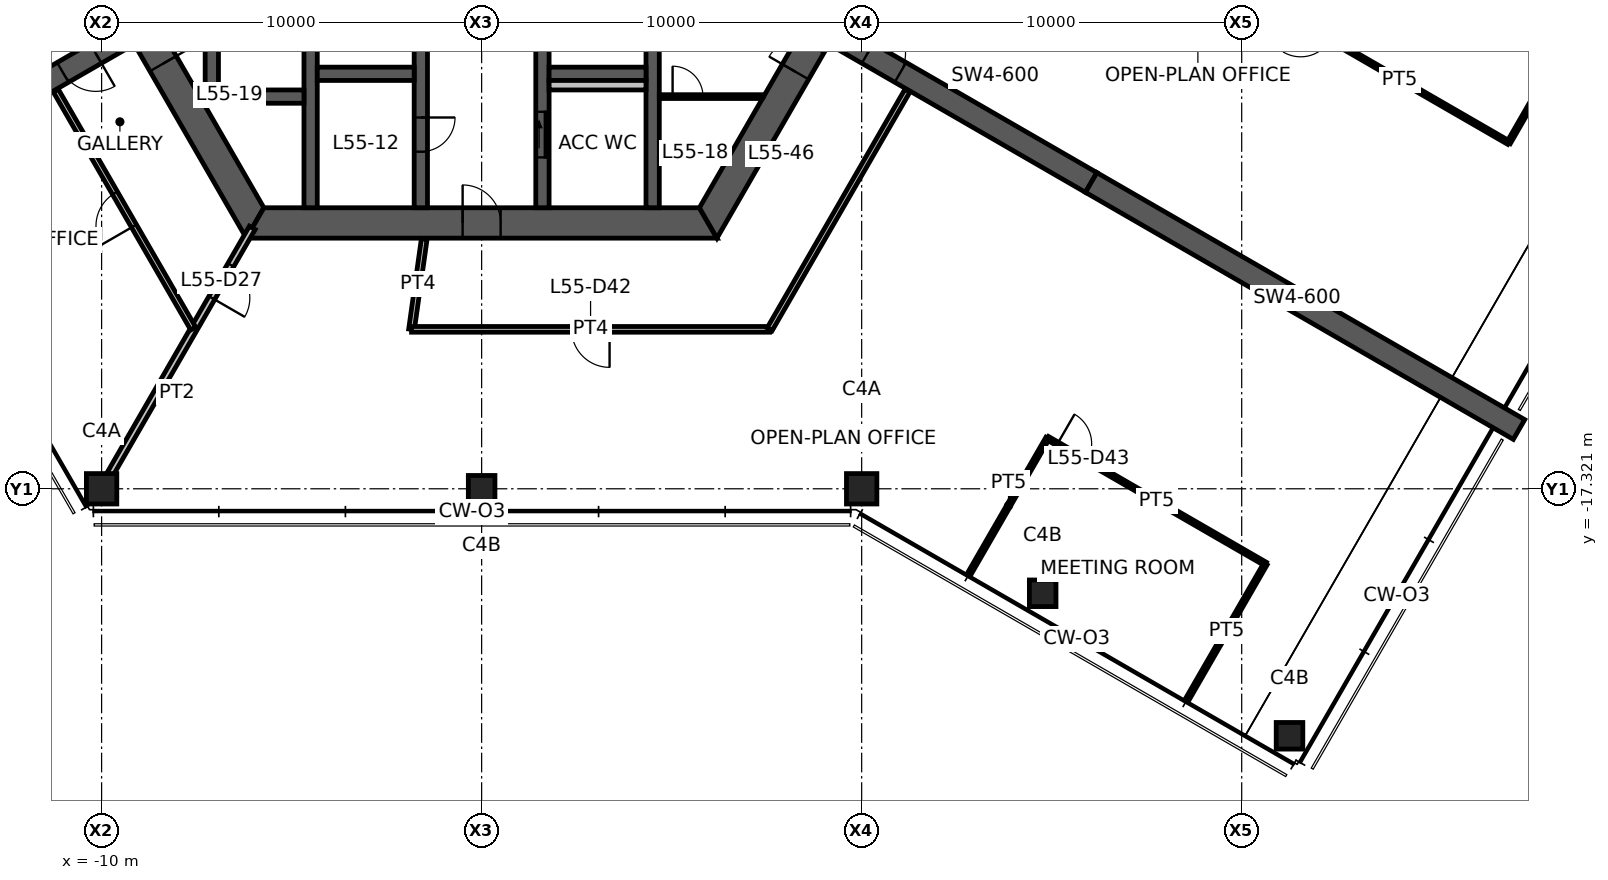
"""IFC4 building model, lengths in metres.
Left out: names, types, materials, properties, quantities, classifications, styles, units other than length and angle.
Written with IfcOpenShell. Run it as: python <this file> out.ifc"""

import sys

from ifc_helpers import new_model, si_unit, direction, frame, frame_2d, origin, origin_2d, place, context, subcontext, project, spatial, polyline, rectangle, hollow_rectangle, outline, extrude, element, fill, save


model = new_model("IFC4")
c1 = context("Model", 3, precision=1e-05, world=origin(), true_north=direction((0.0, 1.0)))
c2 = subcontext(c1, "Body", "Model", "MODEL_VIEW")
j1 = project(units=[si_unit("LENGTHUNIT", "METRE"), si_unit("PLANEANGLEUNIT", "RADIAN")], contexts=[c1])
p1 = place(None, origin())
s1 = spatial("IfcSite", under=j1, at=p1, CompositionType="ELEMENT")
p2 = place(p1, origin())
s2 = spatial("IfcBuilding", under=s1, at=p2, CompositionType="ELEMENT")
p3 = place(p2, frame((0.0, 0.0, 220.6)))
s3 = spatial("IfcBuildingStorey", under=s2, at=p3, CompositionType="ELEMENT", Elevation=220.6)
for number, where, z_axis, x_axis in (
    (1, (-10.0, -17.321, 0.0), (0.0, 0.0, 1.0), (1.0, 0.0, 0.0)),
    (2, (10.0, -17.321, 0.0), (0.0, 0.0, 1.0), (1.0, 0.0, 0.0)),
):
    element("IfcColumn", number, at=place(p3, frame(where, z_axis=z_axis, x_axis=x_axis)), inside=s3, PredefinedType="COLUMN", context=c2, shape_type="SweptSolid", body=[
        extrude(hollow_rectangle(XDim=0.8, YDim=0.8, WallThickness=0.04, at=origin_2d()), origin(), (0.0, 0.0, 1.0), 3.9),
    ])
for number, where, z_axis, x_axis in (
    (3, (0.0, -17.321, 0.0), (0.0, 0.0, 1.0), (1.0, 0.0, 0.0)),
    (4, (14.763, -20.071, 0.0), (0.0, 0.0, 1.0), (1.0, 0.0, 0.0)),
    (5, (21.258, -23.821, 0.0), (0.0, 0.0, 1.0), (1.0, 0.0, 0.0)),
):
    element("IfcColumn", number, at=place(p3, frame(where, z_axis=z_axis, x_axis=x_axis)), inside=s3, PredefinedType="COLUMN", context=c2, shape_type="SweptSolid", body=[
        extrude(hollow_rectangle(XDim=0.7, YDim=0.7, WallThickness=0.032, at=origin_2d()), origin(), (0.0, 0.0, 1.0), 3.9),
    ])
p4 = place(p3, frame((-11.922, 0.0, 0.0), z_axis=(0.0, 0.0, 1.0), x_axis=(0.500004296715, -0.866022923061, 0.0)))
e6 = element("IfcWall", 6, at=p4, inside=s3, PredefinedType="SHEAR", context=c2, shape_type="SweptSolid", body=[
    extrude(outline(polyline([(-0.231, -0.4), (6.281, -0.4), (7.081, -0.4), (12.153, -0.4), (11.691, 0.4), (7.081, 0.4), (6.281, 0.4), (0.231, 0.4), (-0.231, -0.4)])), origin(), (0.0, 0.0, 1.0), 3.9),
])
p5 = place(p4, frame((6.281, 0.0, 0.0)))
e7 = element("IfcOpeningElement", 7, at=p5, cuts=e6, PredefinedType="OPENING", context=c2, shape_type="SweptSolid", body=[
    extrude(rectangle(XDim=0.8, YDim=2.1, at=frame_2d((0.4, 1.05))), frame((0.0, 0.41, 0.0), z_axis=(0.0, -1.0, 0.0), x_axis=(1.0, 0.0, 0.0)), (0.0, 0.0, 1.0), 0.82),
])
p6 = place(p3, frame((-5.961, -10.325, 0.0), z_axis=(0.0, 0.0, 1.0), x_axis=(1.0, 0.0, 0.0)))
e8 = element("IfcWall", 8, at=p6, inside=s3, PredefinedType="SHEAR", context=c2, shape_type="SweptSolid", body=[
    extrude(outline(polyline([(-0.231, -0.4), (5.461, -0.4), (6.461, -0.4), (12.153, -0.4), (11.691, 0.4), (6.461, 0.4), (5.461, 0.4), (0.231, 0.4), (-0.231, -0.4)])), origin(), (0.0, 0.0, 1.0), 3.9),
])
p7 = place(p6, frame((5.461, 0.0, 0.0)))
e9 = element("IfcOpeningElement", 9, at=p7, cuts=e8, PredefinedType="OPENING", context=c2, shape_type="SweptSolid", body=[
    extrude(rectangle(XDim=1.0, YDim=2.1, at=frame_2d((0.5, 1.05))), frame((0.0, 0.41, 0.0), z_axis=(0.0, -1.0, 0.0), x_axis=(1.0, 0.0, 0.0)), (0.0, 0.0, 1.0), 0.82),
])
p8 = place(p3, frame((5.961, -10.325, 0.0), z_axis=(0.0, 0.0, 1.0), x_axis=(0.500004296715, 0.866022923061, 0.0)))
e10 = element("IfcWall", 10, at=p8, inside=s3, PredefinedType="SHEAR", context=c2, shape_type="SweptSolid", body=[
    extrude(outline(polyline([(-0.231, -0.4), (4.594, -0.4), (5.394, -0.4), (12.153, -0.4), (11.691, 0.4), (5.394, 0.4), (4.594, 0.4), (0.231, 0.4), (-0.231, -0.4)])), origin(), (0.0, 0.0, 1.0), 3.9),
])
p9 = place(p8, frame((4.594, 0.0, 0.0)))
e11 = element("IfcOpeningElement", 11, at=p9, cuts=e10, PredefinedType="OPENING", context=c2, shape_type="SweptSolid", body=[
    extrude(rectangle(XDim=0.8, YDim=2.1, at=frame_2d((0.4, 1.05))), frame((0.0, 0.41, 0.0), z_axis=(0.0, -1.0, 0.0), x_axis=(1.0, 0.0, 0.0)), (0.0, 0.0, 1.0), 0.82),
])
p10 = place(p3, frame((-9.288, -5.363, 0.0), z_axis=(0.0, 0.0, 1.0), x_axis=(-0.866027473358, -0.499996415376, 0.0)))
e12 = element("IfcWall", 12, at=p10, inside=s3, PredefinedType="SHEAR", context=c2, shape_type="SweptSolid", body=[
    extrude(rectangle(XDim=7.045, YDim=0.6, at=frame_2d((3.523, 0.0))), origin(), (0.0, 0.0, 1.0), 3.9),
])
p11 = place(p10, frame((1.0, 0.0, 0.0)))
e13 = element("IfcOpeningElement", 13, at=p11, cuts=e12, PredefinedType="OPENING", context=c2, shape_type="SweptSolid", body=[
    extrude(rectangle(XDim=1.0, YDim=2.1, at=frame_2d((0.5, 1.05))), frame((0.0, 0.31, 0.0), z_axis=(0.0, -1.0, 0.0), x_axis=(1.0, 0.0, 0.0)), (0.0, 0.0, 1.0), 0.62),
])
p12 = place(p3, frame((9.288, -5.363, 0.0), z_axis=(0.0, 0.0, 1.0), x_axis=(0.866031736626, -0.499989031036, 0.0)))
e14 = element("IfcWall", 14, at=p12, inside=s3, PredefinedType="SHEAR", context=c2, shape_type="SweptSolid", body=[
    extrude(rectangle(XDim=7.796, YDim=0.6, at=frame_2d((3.898, 0.0))), origin(), (0.0, 0.0, 1.0), 3.9),
])
p13 = place(p12, frame((1.0, 0.0, 0.0)))
e15 = element("IfcOpeningElement", 15, at=p13, cuts=e14, PredefinedType="OPENING", context=c2, shape_type="SweptSolid", body=[
    extrude(rectangle(XDim=1.0, YDim=2.1, at=frame_2d((0.5, 1.05))), frame((0.0, 0.31, 0.0), z_axis=(0.0, -1.0, 0.0), x_axis=(1.0, 0.0, 0.0)), (0.0, 0.0, 1.0), 0.62),
])
p14 = place(p3, frame((16.039, -9.26, 0.0), z_axis=(0.0, 0.0, 1.0), x_axis=(0.866024837091, -0.50000098154, 0.0)))
e16 = element("IfcWall", 16, at=p14, inside=s3, PredefinedType="SHEAR", context=c2, shape_type="SweptSolid", body=[
    extrude(rectangle(XDim=13.0, YDim=0.6, at=frame_2d((6.5, 0.0))), origin(), (0.0, 0.0, 1.0), 3.9),
])
p15 = place(p3, frame((-1.6, -3.775, 0.0), z_axis=(0.0, 0.0, 1.0), x_axis=(0.0, -1.0, 0.0)))
e17 = element("IfcWall", 17, at=p15, inside=s3, PredefinedType="SHEAR", context=c2, shape_type="SweptSolid", body=[
    extrude(rectangle(XDim=6.15, YDim=0.35, at=frame_2d((3.075, 0.0))), origin(), (0.0, 0.0, 1.0), 3.9),
])
p16 = place(p15, frame((3.775, 0.0, 0.0)))
e18 = element("IfcOpeningElement", 18, at=p16, cuts=e17, PredefinedType="OPENING", context=c2, shape_type="SweptSolid", body=[
    extrude(rectangle(XDim=0.9, YDim=2.1, at=frame_2d((0.45, 1.05))), frame((0.0, 0.185, 0.0), z_axis=(0.0, -1.0, 0.0), x_axis=(1.0, 0.0, 0.0)), (0.0, 0.0, 1.0), 0.37),
])
p17 = place(p3, frame((1.6, -3.775, 0.0), z_axis=(0.0, 0.0, 1.0), x_axis=(0.0, -1.0, 0.0)))
e19 = element("IfcWall", 19, at=p17, inside=s3, PredefinedType="SHEAR", context=c2, shape_type="SweptSolid", body=[
    extrude(rectangle(XDim=6.15, YDim=0.35, at=frame_2d((3.075, 0.0))), origin(), (0.0, 0.0, 1.0), 3.9),
])
p18 = place(p17, frame((3.625, 0.0, 0.0)))
e20 = element("IfcOpeningElement", 20, at=p18, cuts=e19, PredefinedType="OPENING", context=c2, shape_type="SweptSolid", body=[
    extrude(rectangle(XDim=1.2, YDim=2.1, at=frame_2d((0.6, 1.05))), frame((0.0, 0.185, 0.0), z_axis=(0.0, -1.0, 0.0), x_axis=(1.0, 0.0, 0.0)), (0.0, 0.0, 1.0), 0.37),
])
for number, where, z_axis, x_axis in (
    (21, (-4.5, -3.775, 0.0), (0.0, 0.0, 1.0), (0.0, -1.0, 0.0)),
    (22, (4.5, -3.775, 0.0), (0.0, 0.0, 1.0), (0.0, -1.0, 0.0)),
):
    element("IfcWall", number, at=place(p3, frame(where, z_axis=z_axis, x_axis=x_axis)), inside=s3, PredefinedType="SHEAR", context=c2, shape_type="SweptSolid", body=[
        extrude(rectangle(XDim=6.15, YDim=0.35, at=frame_2d((3.075, 0.0))), origin(), (0.0, 0.0, 1.0), 3.9),
    ])
for number, where, z_axis, x_axis in (
    (23, (-4.325, -6.4, 0.0), (0.0, 0.0, 1.0), (1.0, 0.0, 0.0)),
    (24, (1.775, -6.4, 0.0), (0.0, 0.0, 1.0), (1.0, 0.0, 0.0)),
):
    element("IfcWall", number, at=place(p3, frame(where, z_axis=z_axis, x_axis=x_axis)), inside=s3, PredefinedType="SHEAR", context=c2, shape_type="SweptSolid", body=[
        extrude(rectangle(XDim=2.55, YDim=0.35, at=frame_2d((1.275, 0.0))), origin(), (0.0, 0.0, 1.0), 3.9),
    ])
p19 = place(p3, frame((-7.275, -7.0, 0.0), z_axis=(0.0, 0.0, 1.0), x_axis=(1.0, 0.0, 0.0)))
e25 = element("IfcWall", 25, at=p19, inside=s3, PredefinedType="SHEAR", context=c2, shape_type="SweptSolid", body=[
    extrude(rectangle(XDim=2.6, YDim=0.35, at=frame_2d((1.3, 0.0))), origin(), (0.0, 0.0, 1.0), 3.9),
])
p20 = place(p3, frame((-7.1, -3.775, 0.0), z_axis=(0.0, 0.0, 1.0), x_axis=(0.0, -1.0, 0.0)))
e26 = element("IfcWall", 26, at=p20, inside=s3, PredefinedType="SHEAR", context=c2, shape_type="SweptSolid", body=[
    extrude(rectangle(XDim=3.05, YDim=0.35, at=frame_2d((1.525, 0.0))), origin(), (0.0, 0.0, 1.0), 3.9),
])
p21 = place(p3, frame((1.775, -6.7, 0.0), z_axis=(0.0, 0.0, 1.0), x_axis=(1.0, 0.0, 0.0)))
e27 = element("IfcWall", 27, at=p21, inside=s3, PredefinedType="PLUMBINGWALL", context=c2, shape_type="SweptSolid", body=[
    extrude(rectangle(XDim=2.55, YDim=0.25, at=frame_2d((1.275, 0.0))), origin(), (0.0, 0.0, 1.0), 3.9),
])
p22 = place(p3, frame((4.675, -7.0, 0.0), z_axis=(0.0, 0.0, 1.0), x_axis=(1.0, 0.0, 0.0)))
e28 = element("IfcWall", 28, at=p22, inside=s3, PredefinedType="PARTITIONING", context=c2, shape_type="SweptSolid", body=[
    extrude(outline(polyline([(0.0, -0.05), (0.35, -0.05), (1.15, -0.05), (2.715, -0.05), (2.744, 0.0), (2.75, 0.05), (1.15, 0.05), (0.35, 0.05), (0.0, 0.05), (0.0, -0.05)])), origin(), (0.0, 0.0, 1.0), 2.95),
])
p23 = place(p22, frame((0.35, 0.0, 0.0)))
e29 = element("IfcOpeningElement", 29, at=p23, cuts=e28, PredefinedType="OPENING", context=c2, shape_type="SweptSolid", body=[
    extrude(rectangle(XDim=0.8, YDim=2.1, at=frame_2d((0.4, 1.05))), frame((0.0, 0.06, 0.0), z_axis=(0.0, -1.0, 0.0), x_axis=(1.0, 0.0, 0.0)), (0.0, 0.0, 1.0), 0.12),
])
p24 = place(p3, frame((-6.035, -10.453, 0.0), z_axis=(0.0, 0.0, 1.0), x_axis=(-0.499989830942, -0.866031274813, 0.0)))
e30 = element("IfcWall", 30, at=p24, inside=s3, PredefinedType="PARTITIONING", context=c2, shape_type="SweptSolid", body=[
    extrude(rectangle(XDim=7.93, YDim=0.175, at=frame_2d((3.965, 0.0))), origin(), (0.0, 0.0, 1.0), 3.05),
])
p25 = place(p24, frame((1.13, 0.0, 0.0)))
e31 = element("IfcOpeningElement", 31, at=p25, cuts=e30, PredefinedType="OPENING", context=c2, shape_type="SweptSolid", body=[
    extrude(rectangle(XDim=1.0, YDim=2.1, at=frame_2d((0.5, 1.05))), frame((0.0, 0.098, 0.0), z_axis=(0.0, -1.0, 0.0), x_axis=(1.0, 0.0, 0.0)), (0.0, 0.0, 1.0), 0.195),
])
p26 = place(p3, frame((-7.589, -13.105, 0.0), z_axis=(0.0, 0.0, 1.0), x_axis=(-0.499986333712, 0.866033293876, 0.0)))
e32 = element("IfcWall", 32, at=p26, inside=s3, PredefinedType="PARTITIONING", context=c2, shape_type="SweptSolid", body=[
    extrude(rectangle(XDim=7.235, YDim=0.15, at=frame_2d((3.617, 0.0))), origin(), (0.0, 0.0, 1.0), 2.95),
])
p27 = place(p26, frame((3.117, 0.0, 0.0)))
e33 = element("IfcOpeningElement", 33, at=p27, cuts=e32, PredefinedType="OPENING", context=c2, shape_type="SweptSolid", body=[
    extrude(rectangle(XDim=1.0, YDim=2.1, at=frame_2d((0.5, 1.05))), frame((0.0, 0.085, 0.0), z_axis=(0.0, -1.0, 0.0), x_axis=(1.0, 0.0, 0.0)), (0.0, 0.0, 1.0), 0.17),
])
p28 = place(p3, frame((27.025, -8.213, 0.0), z_axis=(0.0, 0.0, 1.0), x_axis=(-0.866021597574, 0.500006592492, 0.0)))
e34 = element("IfcWall", 34, at=p28, inside=s3, PredefinedType="PARTITIONING", context=c2, shape_type="SweptSolid", body=[
    extrude(rectangle(XDim=6.62, YDim=0.1, at=frame_2d((3.31, 0.0))), origin(), (0.0, 0.0, 1.0), 2.95),
])
p29 = place(p28, frame((5.42, 0.0, 0.0)))
e35 = element("IfcOpeningElement", 35, at=p29, cuts=e34, PredefinedType="OPENING", context=c2, shape_type="SweptSolid", body=[
    extrude(rectangle(XDim=0.9, YDim=2.1, at=frame_2d((0.45, 1.05))), frame((0.0, 0.06, 0.0), z_axis=(0.0, -1.0, 0.0), x_axis=(1.0, 0.0, 0.0)), (0.0, 0.0, 1.0), 0.12),
])
p30 = place(p3, frame((29.08, -4.653, 0.0), z_axis=(0.0, 0.0, 1.0), x_axis=(-0.500010383074, -0.866019409031, 0.0)))
e36 = element("IfcWall", 36, at=p30, inside=s3, PredefinedType="PARTITIONING", context=c2, shape_type="SweptSolid", body=[
    extrude(rectangle(XDim=4.11, YDim=0.1, at=frame_2d((2.055, 0.0))), origin(), (0.0, 0.0, 1.0), 2.95),
])
p31 = place(p3, frame((-1.844, -13.125, 0.0), z_axis=(0.0, 0.0, 1.0), x_axis=(0.139173892267, 0.99026795753, 0.0)))
e37 = element("IfcWall", 37, at=p31, inside=s3, PredefinedType="PARTITIONING", context=c2, shape_type="SweptSolid", body=[
    extrude(rectangle(XDim=2.403, YDim=0.15, at=frame_2d((1.202, 0.0))), origin(), (0.0, 0.0, 1.0), 2.95),
])
p32 = place(p3, frame((7.578, -13.125, 0.0), z_axis=(0.0, 0.0, 1.0), x_axis=(-1.0, 0.0, 0.0)))
e38 = element("IfcWall", 38, at=p32, inside=s3, PredefinedType="PARTITIONING", context=c2, shape_type="SweptSolid", body=[
    extrude(rectangle(XDim=9.422, YDim=0.15, at=frame_2d((4.711, 0.0))), origin(), (0.0, 0.0, 1.0), 2.95),
])
p33 = place(p32, frame((4.211, 0.0, 0.0)))
e39 = element("IfcOpeningElement", 39, at=p33, cuts=e38, PredefinedType="OPENING", context=c2, shape_type="SweptSolid", body=[
    extrude(rectangle(XDim=1.0, YDim=2.1, at=frame_2d((0.5, 1.05))), frame((0.0, 0.085, 0.0), z_axis=(0.0, -1.0, 0.0), x_axis=(1.0, 0.0, 0.0)), (0.0, 0.0, 1.0), 0.17),
])
p34 = place(p3, frame((11.207, -6.84, 0.0), z_axis=(0.0, 0.0, 1.0), x_axis=(-0.500002959843, -0.866023694911, 0.0)))
e40 = element("IfcWall", 40, at=p34, inside=s3, PredefinedType="PARTITIONING", context=c2, shape_type="SweptSolid", body=[
    extrude(rectangle(XDim=7.258, YDim=0.15, at=frame_2d((3.629, 0.0))), origin(), (0.0, 0.0, 1.0), 2.95),
])
p35 = place(p3, frame((12.837, -19.548, 0.0), z_axis=(0.0, 0.0, 1.0), x_axis=(0.499965833383, 0.866045128991, 0.0)))
e41 = element("IfcWall", 41, at=p35, inside=s3, PredefinedType="PARTITIONING", context=c2, shape_type="SweptSolid", body=[
    extrude(rectangle(XDim=4.11, YDim=0.1, at=frame_2d((2.055, 0.0))), origin(), (0.0, 0.0, 1.0), 2.95),
])
p36 = place(p3, frame((14.892, -15.988, 0.0), z_axis=(0.0, 0.0, 1.0), x_axis=(0.866030817826, -0.499990622488, 0.0)))
e42 = element("IfcWall", 42, at=p36, inside=s3, PredefinedType="PARTITIONING", context=c2, shape_type="SweptSolid", body=[
    extrude(rectangle(XDim=6.62, YDim=0.1, at=frame_2d((3.31, 0.0))), origin(), (0.0, 0.0, 1.0), 2.95),
])
p37 = place(p36, frame((0.3, 0.0, 0.0)))
e43 = element("IfcOpeningElement", 43, at=p37, cuts=e42, PredefinedType="OPENING", context=c2, shape_type="SweptSolid", body=[
    extrude(rectangle(XDim=0.9, YDim=2.1, at=frame_2d((0.45, 1.05))), frame((0.0, 0.06, 0.0), z_axis=(0.0, -1.0, 0.0), x_axis=(1.0, 0.0, 0.0)), (0.0, 0.0, 1.0), 0.12),
])
p38 = place(p3, frame((20.625, -19.298, 0.0), z_axis=(0.0, 0.0, 1.0), x_axis=(-0.500000428765, -0.866025156237, 0.0)))
e44 = element("IfcWall", 44, at=p38, inside=s3, PredefinedType="PARTITIONING", context=c2, shape_type="SweptSolid", body=[
    extrude(rectangle(XDim=4.08, YDim=0.1, at=frame_2d((2.04, 0.0))), origin(), (0.0, 0.0, 1.0), 2.95),
])
p39 = place(p7, origin())
e45 = element("IfcDoor", 45, at=p39, inside=s3, OperationType="SINGLE_SWING_LEFT", PredefinedType="DOOR", context=c2, shape_type="SweptSolid", body=[
    extrude(rectangle(XDim=1.0, YDim=2.1, at=frame_2d((0.5, 1.05))), frame((0.0, 0.025, 0.0), z_axis=(0.0, -1.0, 0.0), x_axis=(1.0, 0.0, 0.0)), (0.0, 0.0, 1.0), 0.05),
])
fill(e9, e45)
p40 = place(p9, origin())
e46 = element("IfcDoor", 46, at=p40, inside=s3, OperationType="SINGLE_SWING_LEFT", PredefinedType="DOOR", context=c2, shape_type="SweptSolid", body=[
    extrude(rectangle(XDim=0.8, YDim=2.1, at=frame_2d((0.4, 1.05))), frame((0.0, 0.025, 0.0), z_axis=(0.0, -1.0, 0.0), x_axis=(1.0, 0.0, 0.0)), (0.0, 0.0, 1.0), 0.05),
])
fill(e11, e46)
p41 = place(p5, origin())
e47 = element("IfcDoor", 47, at=p41, inside=s3, OperationType="SINGLE_SWING_RIGHT", PredefinedType="DOOR", context=c2, shape_type="SweptSolid", body=[
    extrude(rectangle(XDim=0.8, YDim=2.1, at=frame_2d((0.4, 1.05))), frame((0.0, 0.025, 0.0), z_axis=(0.0, -1.0, 0.0), x_axis=(1.0, 0.0, 0.0)), (0.0, 0.0, 1.0), 0.05),
])
fill(e7, e47)
p42 = place(p18, origin())
e48 = element("IfcDoor", 48, at=p42, inside=s3, OperationType="SLIDING_TO_LEFT", PredefinedType="DOOR", context=c2, shape_type="SweptSolid", body=[
    extrude(rectangle(XDim=1.2, YDim=2.1, at=frame_2d((0.6, 1.05))), frame((0.0, 0.025, 0.0), z_axis=(0.0, -1.0, 0.0), x_axis=(1.0, 0.0, 0.0)), (0.0, 0.0, 1.0), 0.05),
])
fill(e20, e48)
p43 = place(p16, origin())
e49 = element("IfcDoor", 49, at=p43, inside=s3, OperationType="SINGLE_SWING_LEFT", PredefinedType="DOOR", context=c2, shape_type="SweptSolid", body=[
    extrude(rectangle(XDim=0.9, YDim=2.1, at=frame_2d((0.45, 1.05))), frame((0.0, 0.025, 0.0), z_axis=(0.0, -1.0, 0.0), x_axis=(1.0, 0.0, 0.0)), (0.0, 0.0, 1.0), 0.05),
])
fill(e18, e49)
p44 = place(p11, origin())
e50 = element("IfcDoor", 50, at=p44, inside=s3, OperationType="SINGLE_SWING_LEFT", PredefinedType="DOOR", context=c2, shape_type="SweptSolid", body=[
    extrude(rectangle(XDim=1.0, YDim=2.1, at=frame_2d((0.5, 1.05))), frame((0.0, 0.025, 0.0), z_axis=(0.0, -1.0, 0.0), x_axis=(1.0, 0.0, 0.0)), (0.0, 0.0, 1.0), 0.05),
])
fill(e13, e50)
p45 = place(p13, origin())
e51 = element("IfcDoor", 51, at=p45, inside=s3, OperationType="SINGLE_SWING_LEFT", PredefinedType="DOOR", context=c2, shape_type="SweptSolid", body=[
    extrude(rectangle(XDim=1.0, YDim=2.1, at=frame_2d((0.5, 1.05))), frame((0.0, 0.025, 0.0), z_axis=(0.0, -1.0, 0.0), x_axis=(1.0, 0.0, 0.0)), (0.0, 0.0, 1.0), 0.05),
])
fill(e15, e51)
p46 = place(p23, origin())
e52 = element("IfcDoor", 52, at=p46, inside=s3, OperationType="SINGLE_SWING_LEFT", PredefinedType="DOOR", context=c2, shape_type="SweptSolid", body=[
    extrude(rectangle(XDim=0.8, YDim=2.1, at=frame_2d((0.4, 1.05))), frame((0.0, 0.025, 0.0), z_axis=(0.0, -1.0, 0.0), x_axis=(1.0, 0.0, 0.0)), (0.0, 0.0, 1.0), 0.05),
])
fill(e29, e52)
p47 = place(p25, origin())
e53 = element("IfcDoor", 53, at=p47, inside=s3, OperationType="SINGLE_SWING_RIGHT", PredefinedType="DOOR", context=c2, shape_type="SweptSolid", body=[
    extrude(rectangle(XDim=1.0, YDim=2.1, at=frame_2d((0.5, 1.05))), frame((0.0, 0.025, 0.0), z_axis=(0.0, -1.0, 0.0), x_axis=(1.0, 0.0, 0.0)), (0.0, 0.0, 1.0), 0.05),
])
fill(e31, e53)
p48 = place(p27, origin())
e54 = element("IfcDoor", 54, at=p48, inside=s3, OperationType="SINGLE_SWING_LEFT", PredefinedType="DOOR", context=c2, shape_type="SweptSolid", body=[
    extrude(rectangle(XDim=1.0, YDim=2.1, at=frame_2d((0.5, 1.05))), frame((0.0, 0.025, 0.0), z_axis=(0.0, -1.0, 0.0), x_axis=(1.0, 0.0, 0.0)), (0.0, 0.0, 1.0), 0.05),
])
fill(e33, e54)
p49 = place(p33, origin())
e55 = element("IfcDoor", 55, at=p49, inside=s3, OperationType="SINGLE_SWING_LEFT", PredefinedType="DOOR", context=c2, shape_type="SweptSolid", body=[
    extrude(rectangle(XDim=1.0, YDim=2.1, at=frame_2d((0.5, 1.05))), frame((0.0, 0.025, 0.0), z_axis=(0.0, -1.0, 0.0), x_axis=(1.0, 0.0, 0.0)), (0.0, 0.0, 1.0), 0.05),
])
fill(e39, e55)
p50 = place(p37, origin())
e56 = element("IfcDoor", 56, at=p50, inside=s3, OperationType="SINGLE_SWING_LEFT", PredefinedType="DOOR", context=c2, shape_type="SweptSolid", body=[
    extrude(rectangle(XDim=0.9, YDim=2.1, at=frame_2d((0.45, 1.05))), frame((0.0, 0.025, 0.0), z_axis=(0.0, -1.0, 0.0), x_axis=(1.0, 0.0, 0.0)), (0.0, 0.0, 1.0), 0.05),
])
fill(e43, e56)
save(model, sys.argv[1])
